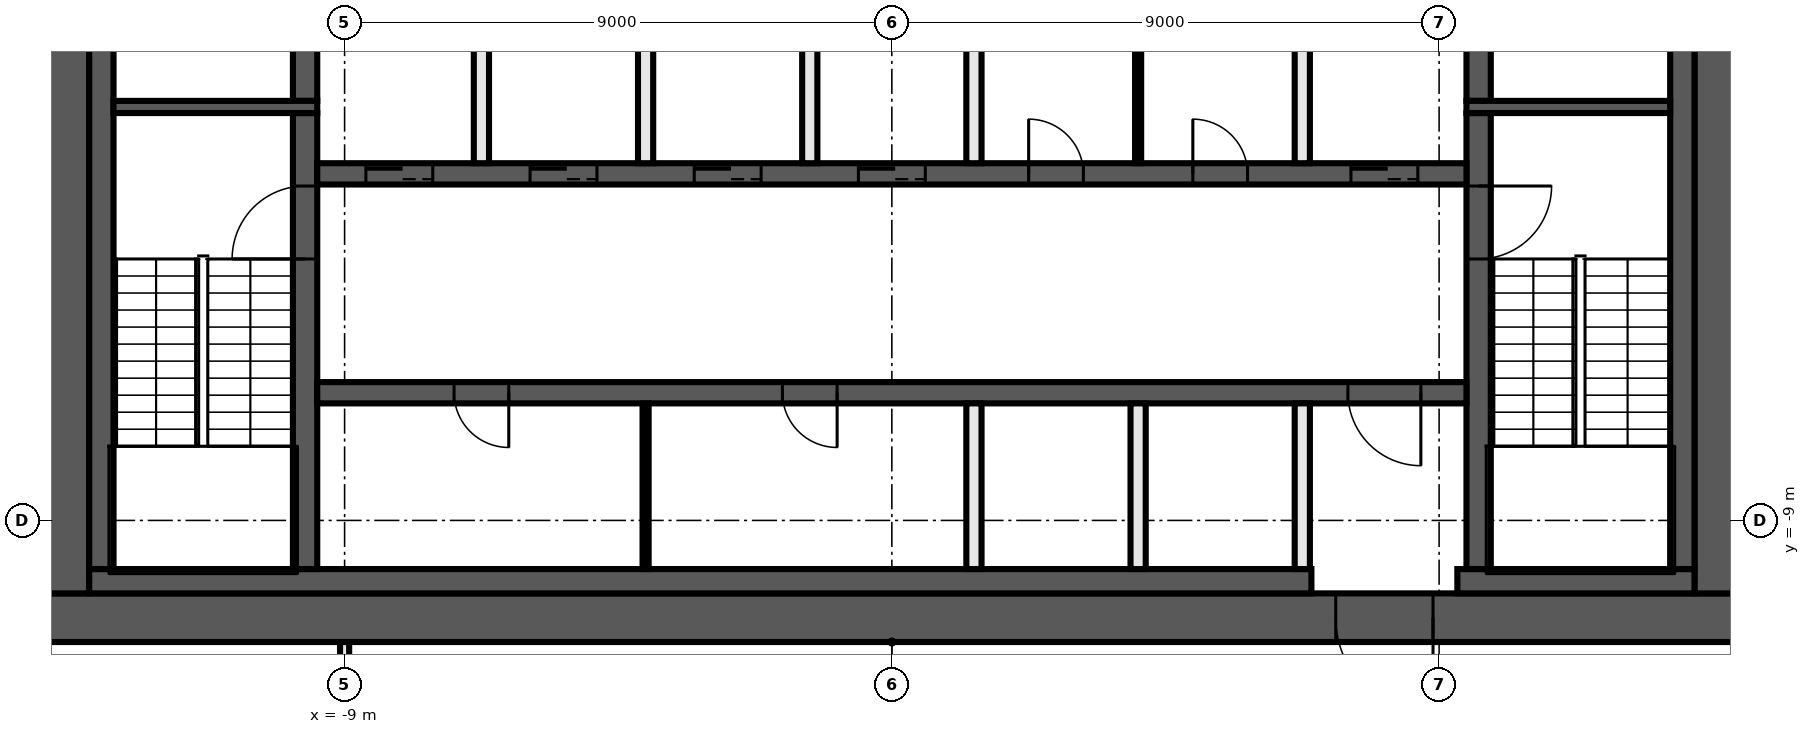
"""IFC4 building model, lengths in metres.
Left out: names, types, materials, properties, quantities, classifications, styles, units other than length and angle.
Written with IfcOpenShell. Run it as: python <this file> out.ifc"""

import sys

from ifc_helpers import new_model, si_unit, direction, frame, frame_2d, origin, place, context, subcontext, project, spatial, rectangle, extrude, element, fill, save


model = new_model("IFC4")
c1 = context("Model", 3, precision=1e-05, world=origin(), true_north=direction((0.0, 1.0)))
c2 = subcontext(c1, "Body", "Model", "MODEL_VIEW")
j1 = project(units=[si_unit("LENGTHUNIT", "METRE"), si_unit("PLANEANGLEUNIT", "RADIAN")], contexts=[c1])
p1 = place(None, origin())
s1 = spatial("IfcSite", under=j1, at=p1, CompositionType="ELEMENT")
p2 = place(p1, origin())
s2 = spatial("IfcBuilding", under=s1, at=p2, CompositionType="ELEMENT")
p3 = place(p2, frame((0.0, 0.0, 162.8)))
s3 = spatial("IfcBuildingStorey", under=s2, at=p3, CompositionType="ELEMENT", Elevation=162.8)
p4 = place(p3, frame((-9.0, -13.925, 0.0), z_axis=(0.0, 0.0, 1.0), x_axis=(0.0, 1.0, 0.0)))
e1 = element("IfcWall", 1, at=p4, inside=s3, PredefinedType="PARTITIONING", context=c2, shape_type="SweptSolid", body=[
    extrude(rectangle(XDim=2.925, YDim=0.15, at=frame_2d((1.462, 0.0))), origin(), (0.0, 0.0, 1.0), 3.82),
])
p5 = place(p3, frame((14.0, -10.6, 0.0), z_axis=(0.0, 0.0, 1.0), x_axis=(-1.0, 0.0, 0.0)))
e2 = element("IfcWall", 2, at=p5, inside=s3, PredefinedType="SHEAR", context=c2, shape_type="SweptSolid", body=[
    extrude(rectangle(XDim=28.0, YDim=0.8, at=frame_2d((14.0, 0.0))), origin(), (0.0, 0.0, 1.0), 3.82),
])
p6 = place(p5, frame((5.1, 0.0, 0.0)))
e3 = element("IfcOpeningElement", 3, at=p6, cuts=e2, PredefinedType="OPENING", context=c2, shape_type="SweptSolid", body=[
    extrude(rectangle(XDim=1.6, YDim=2.1, at=frame_2d((0.8, 1.05))), frame((0.0, 0.41, 0.0), z_axis=(0.0, -1.0, 0.0), x_axis=(1.0, 0.0, 0.0)), (0.0, 0.0, 1.0), 0.82),
])
for number, where, z_axis, x_axis in (
    (4, (13.6, 10.2, 0.0), (0.0, 0.0, 1.0), (0.0, -1.0, 0.0)),
    (5, (-13.6, -10.2, 0.0), (0.0, 0.0, 1.0), (0.0, 1.0, 0.0)),
):
    element("IfcWall", number, at=place(p3, frame(where, z_axis=z_axis, x_axis=x_axis)), inside=s3, PredefinedType="SHEAR", context=c2, shape_type="SweptSolid", body=[
        extrude(rectangle(XDim=20.4, YDim=0.8, at=frame_2d((10.2, 0.0))), origin(), (0.0, 0.0, 1.0), 3.82),
    ])
p7 = place(p3, frame((13.2, -10.0, 0.0), z_axis=(0.0, 0.0, 1.0), x_axis=(-1.0, 0.0, 0.0)))
e6 = element("IfcWall", 6, at=p7, inside=s3, PredefinedType="SHEAR", context=c2, shape_type="SweptSolid", body=[
    extrude(rectangle(XDim=3.9, YDim=0.4, at=frame_2d((1.95, 0.0))), origin(), (0.0, 0.0, 1.0), 3.82),
])
p8 = place(p3, frame((6.9, -10.0, 0.0), z_axis=(0.0, 0.0, 1.0), x_axis=(-1.0, 0.0, 0.0)))
e7 = element("IfcWall", 7, at=p8, inside=s3, PredefinedType="SHEAR", context=c2, shape_type="SweptSolid", body=[
    extrude(rectangle(XDim=20.1, YDim=0.4, at=frame_2d((10.05, 0.0))), origin(), (0.0, 0.0, 1.0), 3.82),
])
for number, where, z_axis, x_axis in (
    (8, (13.0, 9.8, 0.0), (0.0, 0.0, 1.0), (0.0, -1.0, 0.0)),
    (9, (-13.0, -9.8, 0.0), (0.0, 0.0, 1.0), (0.0, 1.0, 0.0)),
):
    element("IfcWall", number, at=place(p3, frame(where, z_axis=z_axis, x_axis=x_axis)), inside=s3, PredefinedType="SHEAR", context=c2, shape_type="SweptSolid", body=[
        extrude(rectangle(XDim=19.6, YDim=0.4, at=frame_2d((9.8, 0.0))), origin(), (0.0, 0.0, 1.0), 3.82),
    ])
p9 = place(p3, frame((9.65, -2.3, 0.0), z_axis=(0.0, 0.0, 1.0), x_axis=(0.0, -1.0, 0.0)))
e10 = element("IfcWall", 10, at=p9, inside=s3, PredefinedType="SHEAR", context=c2, shape_type="SweptSolid", body=[
    extrude(rectangle(XDim=7.5, YDim=0.4, at=frame_2d((3.75, 0.0))), origin(), (0.0, 0.0, 1.0), 3.82),
])
p10 = place(p9, frame((1.2, 0.0, 0.0)))
e11 = element("IfcOpeningElement", 11, at=p10, cuts=e10, PredefinedType="OPENING", context=c2, shape_type="SweptSolid", body=[
    extrude(rectangle(XDim=1.2, YDim=2.1, at=frame_2d((0.6, 1.05))), frame((0.0, 0.21, 0.0), z_axis=(0.0, -1.0, 0.0), x_axis=(1.0, 0.0, 0.0)), (0.0, 0.0, 1.0), 0.42),
])
p11 = place(p3, frame((9.65, 2.1, 0.0), z_axis=(0.0, 0.0, 1.0), x_axis=(0.0, -1.0, 0.0)))
e12 = element("IfcWall", 12, at=p11, inside=s3, PredefinedType="SHEAR", context=c2, shape_type="SweptSolid", body=[
    extrude(rectangle(XDim=4.2, YDim=0.4, at=frame_2d((2.1, 0.0))), origin(), (0.0, 0.0, 1.0), 3.82),
])
p12 = place(p11, frame((0.15, 0.0, 0.0)))
e13 = element("IfcOpeningElement", 13, at=p12, cuts=e12, PredefinedType="OPENING", context=c2, shape_type="SweptSolid", body=[
    extrude(rectangle(XDim=0.9, YDim=2.1, at=frame_2d((0.45, 1.05))), frame((0.0, 0.21, 0.0), z_axis=(0.0, -1.0, 0.0), x_axis=(1.0, 0.0, 0.0)), (0.0, 0.0, 1.0), 0.42),
])
p13 = place(p3, frame((-9.65, -9.8, 0.0), z_axis=(0.0, 0.0, 1.0), x_axis=(0.0, 1.0, 0.0)))
e14 = element("IfcWall", 14, at=p13, inside=s3, PredefinedType="SHEAR", context=c2, shape_type="SweptSolid", body=[
    extrude(rectangle(XDim=7.5, YDim=0.4, at=frame_2d((3.75, 0.0))), origin(), (0.0, 0.0, 1.0), 3.82),
])
p14 = place(p13, frame((5.1, 0.0, 0.0)))
e15 = element("IfcOpeningElement", 15, at=p14, cuts=e14, PredefinedType="OPENING", context=c2, shape_type="SweptSolid", body=[
    extrude(rectangle(XDim=1.2, YDim=2.1, at=frame_2d((0.6, 1.05))), frame((0.0, 0.21, 0.0), z_axis=(0.0, -1.0, 0.0), x_axis=(1.0, 0.0, 0.0)), (0.0, 0.0, 1.0), 0.42),
])
p15 = place(p3, frame((-9.65, -2.1, 0.0), z_axis=(0.0, 0.0, 1.0), x_axis=(0.0, 1.0, 0.0)))
e16 = element("IfcWall", 16, at=p15, inside=s3, PredefinedType="SHEAR", context=c2, shape_type="SweptSolid", body=[
    extrude(rectangle(XDim=4.2, YDim=0.4, at=frame_2d((2.1, 0.0))), origin(), (0.0, 0.0, 1.0), 3.82),
])
for number, where, z_axis, x_axis in (
    (17, (9.45, -2.2, 0.0), (0.0, 0.0, 1.0), (1.0, 0.0, 0.0)),
    (18, (-9.45, -2.2, 0.0), (0.0, 0.0, 1.0), (-1.0, 0.0, 0.0)),
):
    element("IfcWall", number, at=place(p3, frame(where, z_axis=z_axis, x_axis=x_axis)), inside=s3, PredefinedType="SHEAR", context=c2, shape_type="SweptSolid", body=[
        extrude(rectangle(XDim=3.35, YDim=0.2, at=frame_2d((1.675, 0.0))), origin(), (0.0, 0.0, 1.0), 3.82),
    ])
p16 = place(p3, frame((-9.45, -3.3, 0.0), z_axis=(0.0, 0.0, 1.0), x_axis=(1.0, 0.0, 0.0)))
e19 = element("IfcWall", 19, at=p16, inside=s3, PredefinedType="SHEAR", context=c2, shape_type="SweptSolid", body=[
    extrude(rectangle(XDim=18.9, YDim=0.35, at=frame_2d((9.45, 0.0))), origin(), (0.0, 0.0, 1.0), 3.82),
])
p17 = place(p16, frame((0.8, 0.0, 0.0)))
e20 = element("IfcOpeningElement", 20, at=p17, cuts=e19, PredefinedType="OPENING", context=c2, shape_type="SweptSolid", body=[
    extrude(rectangle(XDim=1.1, YDim=2.1, at=frame_2d((0.55, 1.05))), frame((0.0, 0.185, 0.0), z_axis=(0.0, -1.0, 0.0), x_axis=(1.0, 0.0, 0.0)), (0.0, 0.0, 1.0), 0.37),
])
p18 = place(p16, frame((3.5, 0.0, 0.0)))
e21 = element("IfcOpeningElement", 21, at=p18, cuts=e19, PredefinedType="OPENING", context=c2, shape_type="SweptSolid", body=[
    extrude(rectangle(XDim=1.1, YDim=2.1, at=frame_2d((0.55, 1.05))), frame((0.0, 0.185, 0.0), z_axis=(0.0, -1.0, 0.0), x_axis=(1.0, 0.0, 0.0)), (0.0, 0.0, 1.0), 0.37),
])
p19 = place(p16, frame((6.2, 0.0, 0.0)))
e22 = element("IfcOpeningElement", 22, at=p19, cuts=e19, PredefinedType="OPENING", context=c2, shape_type="SweptSolid", body=[
    extrude(rectangle(XDim=1.1, YDim=2.1, at=frame_2d((0.55, 1.05))), frame((0.0, 0.185, 0.0), z_axis=(0.0, -1.0, 0.0), x_axis=(1.0, 0.0, 0.0)), (0.0, 0.0, 1.0), 0.37),
])
p20 = place(p16, frame((8.9, 0.0, 0.0)))
e23 = element("IfcOpeningElement", 23, at=p20, cuts=e19, PredefinedType="OPENING", context=c2, shape_type="SweptSolid", body=[
    extrude(rectangle(XDim=1.1, YDim=2.1, at=frame_2d((0.55, 1.05))), frame((0.0, 0.185, 0.0), z_axis=(0.0, -1.0, 0.0), x_axis=(1.0, 0.0, 0.0)), (0.0, 0.0, 1.0), 0.37),
])
p21 = place(p16, frame((17.0, 0.0, 0.0)))
e24 = element("IfcOpeningElement", 24, at=p21, cuts=e19, PredefinedType="OPENING", context=c2, shape_type="SweptSolid", body=[
    extrude(rectangle(XDim=1.1, YDim=2.1, at=frame_2d((0.55, 1.05))), frame((0.0, 0.185, 0.0), z_axis=(0.0, -1.0, 0.0), x_axis=(1.0, 0.0, 0.0)), (0.0, 0.0, 1.0), 0.37),
])
p22 = place(p16, frame((11.7, 0.0, 0.0)))
e25 = element("IfcOpeningElement", 25, at=p22, cuts=e19, PredefinedType="OPENING", context=c2, shape_type="SweptSolid", body=[
    extrude(rectangle(XDim=0.9, YDim=2.1, at=frame_2d((0.45, 1.05))), frame((0.0, 0.185, 0.0), z_axis=(0.0, -1.0, 0.0), x_axis=(1.0, 0.0, 0.0)), (0.0, 0.0, 1.0), 0.37),
])
p23 = place(p16, frame((14.4, 0.0, 0.0)))
e26 = element("IfcOpeningElement", 26, at=p23, cuts=e19, PredefinedType="OPENING", context=c2, shape_type="SweptSolid", body=[
    extrude(rectangle(XDim=0.9, YDim=2.1, at=frame_2d((0.45, 1.05))), frame((0.0, 0.185, 0.0), z_axis=(0.0, -1.0, 0.0), x_axis=(1.0, 0.0, 0.0)), (0.0, 0.0, 1.0), 0.37),
])
p24 = place(p3, frame((9.45, -6.9, 0.0), z_axis=(0.0, 0.0, 1.0), x_axis=(-1.0, 0.0, 0.0)))
e27 = element("IfcWall", 27, at=p24, inside=s3, PredefinedType="SHEAR", context=c2, shape_type="SweptSolid", body=[
    extrude(rectangle(XDim=18.9, YDim=0.35, at=frame_2d((9.45, 0.0))), origin(), (0.0, 0.0, 1.0), 3.82),
])
p25 = place(p24, frame((0.75, 0.0, 0.0)))
e28 = element("IfcOpeningElement", 28, at=p25, cuts=e27, PredefinedType="OPENING", context=c2, shape_type="SweptSolid", body=[
    extrude(rectangle(XDim=1.2, YDim=2.1, at=frame_2d((0.6, 1.05))), frame((0.0, 0.185, 0.0), z_axis=(0.0, -1.0, 0.0), x_axis=(1.0, 0.0, 0.0)), (0.0, 0.0, 1.0), 0.37),
])
p26 = place(p24, frame((15.75, 0.0, 0.0)))
e29 = element("IfcOpeningElement", 29, at=p26, cuts=e27, PredefinedType="OPENING", context=c2, shape_type="SweptSolid", body=[
    extrude(rectangle(XDim=0.9, YDim=2.1, at=frame_2d((0.45, 1.05))), frame((0.0, 0.185, 0.0), z_axis=(0.0, -1.0, 0.0), x_axis=(1.0, 0.0, 0.0)), (0.0, 0.0, 1.0), 0.37),
])
p27 = place(p24, frame((10.35, 0.0, 0.0)))
e30 = element("IfcOpeningElement", 30, at=p27, cuts=e27, PredefinedType="OPENING", context=c2, shape_type="SweptSolid", body=[
    extrude(rectangle(XDim=0.9, YDim=2.1, at=frame_2d((0.45, 1.05))), frame((0.0, 0.185, 0.0), z_axis=(0.0, -1.0, 0.0), x_axis=(1.0, 0.0, 0.0)), (0.0, 0.0, 1.0), 0.37),
])
for number, where, z_axis, x_axis in (
    (31, (6.75, -9.8, 0.0), (0.0, 0.0, 1.0), (0.0, 1.0, 0.0)),
    (32, (6.75, -3.125, 0.0), (0.0, 0.0, 1.0), (0.0, 1.0, 0.0)),
):
    element("IfcWall", number, at=place(p3, frame(where, z_axis=z_axis, x_axis=x_axis)), inside=s3, PredefinedType="SOLIDWALL", context=c2, shape_type="SweptSolid", body=[
        extrude(rectangle(XDim=2.725, YDim=0.25, at=frame_2d((1.363, 0.0))), origin(), (0.0, 0.0, 1.0), 3.82),
    ])
p28 = place(p3, frame((4.05, -3.125, 0.0), z_axis=(0.0, 0.0, 1.0), x_axis=(0.0, 1.0, 0.0)))
e33 = element("IfcWall", 33, at=p28, inside=s3, PredefinedType="PARTITIONING", context=c2, shape_type="SweptSolid", body=[
    extrude(rectangle(XDim=2.725, YDim=0.1, at=frame_2d((1.363, 0.0))), origin(), (0.0, 0.0, 1.0), 3.82),
])
for number, where, z_axis, x_axis in (
    (34, (4.05, -9.8, 0.0), (0.0, 0.0, 1.0), (0.0, 1.0, 0.0)),
    (35, (1.35, -9.8, 0.0), (0.0, 0.0, 1.0), (0.0, 1.0, 0.0)),
    (36, (1.35, -3.125, 0.0), (0.0, 0.0, 1.0), (0.0, 1.0, 0.0)),
    (37, (-1.35, -3.125, 0.0), (0.0, 0.0, 1.0), (0.0, 1.0, 0.0)),
):
    element("IfcWall", number, at=place(p3, frame(where, z_axis=z_axis, x_axis=x_axis)), inside=s3, PredefinedType="SOLIDWALL", context=c2, shape_type="SweptSolid", body=[
        extrude(rectangle(XDim=2.725, YDim=0.25, at=frame_2d((1.363, 0.0))), origin(), (0.0, 0.0, 1.0), 3.82),
    ])
p29 = place(p3, frame((-4.05, -9.8, 0.0), z_axis=(0.0, 0.0, 1.0), x_axis=(0.0, 1.0, 0.0)))
e38 = element("IfcWall", 38, at=p29, inside=s3, PredefinedType="PARTITIONING", context=c2, shape_type="SweptSolid", body=[
    extrude(rectangle(XDim=2.725, YDim=0.1, at=frame_2d((1.363, 0.0))), origin(), (0.0, 0.0, 1.0), 3.82),
])
for number, where, z_axis, x_axis in (
    (39, (-4.05, -3.125, 0.0), (0.0, 0.0, 1.0), (0.0, 1.0, 0.0)),
    (40, (-6.75, -3.125, 0.0), (0.0, 0.0, 1.0), (0.0, 1.0, 0.0)),
):
    element("IfcWall", number, at=place(p3, frame(where, z_axis=z_axis, x_axis=x_axis)), inside=s3, PredefinedType="SOLIDWALL", context=c2, shape_type="SweptSolid", body=[
        extrude(rectangle(XDim=2.725, YDim=0.25, at=frame_2d((1.363, 0.0))), origin(), (0.0, 0.0, 1.0), 3.82),
    ])
p30 = place(p17, origin())
e41 = element("IfcDoor", 41, at=p30, inside=s3, OperationType="DOUBLE_DOOR_SLIDING", PredefinedType="DOOR", context=c2, shape_type="SweptSolid", body=[
    extrude(rectangle(XDim=1.1, YDim=2.1, at=frame_2d((0.55, 1.05))), frame((0.0, 0.025, 0.0), z_axis=(0.0, -1.0, 0.0), x_axis=(1.0, 0.0, 0.0)), (0.0, 0.0, 1.0), 0.05),
])
fill(e20, e41)
p31 = place(p18, origin())
e42 = element("IfcDoor", 42, at=p31, inside=s3, OperationType="DOUBLE_DOOR_SLIDING", PredefinedType="DOOR", context=c2, shape_type="SweptSolid", body=[
    extrude(rectangle(XDim=1.1, YDim=2.1, at=frame_2d((0.55, 1.05))), frame((0.0, 0.025, 0.0), z_axis=(0.0, -1.0, 0.0), x_axis=(1.0, 0.0, 0.0)), (0.0, 0.0, 1.0), 0.05),
])
fill(e21, e42)
p32 = place(p19, origin())
e43 = element("IfcDoor", 43, at=p32, inside=s3, OperationType="DOUBLE_DOOR_SLIDING", PredefinedType="DOOR", context=c2, shape_type="SweptSolid", body=[
    extrude(rectangle(XDim=1.1, YDim=2.1, at=frame_2d((0.55, 1.05))), frame((0.0, 0.025, 0.0), z_axis=(0.0, -1.0, 0.0), x_axis=(1.0, 0.0, 0.0)), (0.0, 0.0, 1.0), 0.05),
])
fill(e22, e43)
p33 = place(p20, origin())
e44 = element("IfcDoor", 44, at=p33, inside=s3, OperationType="DOUBLE_DOOR_SLIDING", PredefinedType="DOOR", context=c2, shape_type="SweptSolid", body=[
    extrude(rectangle(XDim=1.1, YDim=2.1, at=frame_2d((0.55, 1.05))), frame((0.0, 0.025, 0.0), z_axis=(0.0, -1.0, 0.0), x_axis=(1.0, 0.0, 0.0)), (0.0, 0.0, 1.0), 0.05),
])
fill(e23, e44)
p34 = place(p21, origin())
e45 = element("IfcDoor", 45, at=p34, inside=s3, OperationType="DOUBLE_DOOR_SLIDING", PredefinedType="DOOR", context=c2, shape_type="SweptSolid", body=[
    extrude(rectangle(XDim=1.1, YDim=2.1, at=frame_2d((0.55, 1.05))), frame((0.0, 0.025, 0.0), z_axis=(0.0, -1.0, 0.0), x_axis=(1.0, 0.0, 0.0)), (0.0, 0.0, 1.0), 0.05),
])
fill(e24, e45)
p35 = place(p6, origin())
e46 = element("IfcDoor", 46, at=p35, inside=s3, OperationType="DOUBLE_DOOR_SINGLE_SWING", PredefinedType="DOOR", context=c2, shape_type="SweptSolid", body=[
    extrude(rectangle(XDim=1.6, YDim=2.1, at=frame_2d((0.8, 1.05))), frame((0.0, 0.025, 0.0), z_axis=(0.0, -1.0, 0.0), x_axis=(1.0, 0.0, 0.0)), (0.0, 0.0, 1.0), 0.05),
])
fill(e3, e46)
p36 = place(p25, origin())
e47 = element("IfcDoor", 47, at=p36, inside=s3, OperationType="SINGLE_SWING_LEFT", PredefinedType="DOOR", context=c2, shape_type="SweptSolid", body=[
    extrude(rectangle(XDim=1.2, YDim=2.1, at=frame_2d((0.6, 1.05))), frame((0.0, 0.025, 0.0), z_axis=(0.0, -1.0, 0.0), x_axis=(1.0, 0.0, 0.0)), (0.0, 0.0, 1.0), 0.05),
])
fill(e28, e47)
p37 = place(p22, origin())
e48 = element("IfcDoor", 48, at=p37, inside=s3, OperationType="SINGLE_SWING_RIGHT", PredefinedType="DOOR", context=c2, shape_type="SweptSolid", body=[
    extrude(rectangle(XDim=0.9, YDim=2.1, at=frame_2d((0.45, 1.05))), frame((0.0, 0.025, 0.0), z_axis=(0.0, -1.0, 0.0), x_axis=(1.0, 0.0, 0.0)), (0.0, 0.0, 1.0), 0.05),
])
fill(e25, e48)
p38 = place(p23, origin())
e49 = element("IfcDoor", 49, at=p38, inside=s3, OperationType="SINGLE_SWING_LEFT", PredefinedType="DOOR", context=c2, shape_type="SweptSolid", body=[
    extrude(rectangle(XDim=0.9, YDim=2.1, at=frame_2d((0.45, 1.05))), frame((0.0, 0.025, 0.0), z_axis=(0.0, -1.0, 0.0), x_axis=(1.0, 0.0, 0.0)), (0.0, 0.0, 1.0), 0.05),
])
fill(e26, e49)
p39 = place(p26, origin())
e50 = element("IfcDoor", 50, at=p39, inside=s3, OperationType="SINGLE_SWING_RIGHT", PredefinedType="DOOR", context=c2, shape_type="SweptSolid", body=[
    extrude(rectangle(XDim=0.9, YDim=2.1, at=frame_2d((0.45, 1.05))), frame((0.0, 0.025, 0.0), z_axis=(0.0, -1.0, 0.0), x_axis=(1.0, 0.0, 0.0)), (0.0, 0.0, 1.0), 0.05),
])
fill(e29, e50)
p40 = place(p27, origin())
e51 = element("IfcDoor", 51, at=p40, inside=s3, OperationType="SINGLE_SWING_LEFT", PredefinedType="DOOR", context=c2, shape_type="SweptSolid", body=[
    extrude(rectangle(XDim=0.9, YDim=2.1, at=frame_2d((0.45, 1.05))), frame((0.0, 0.025, 0.0), z_axis=(0.0, -1.0, 0.0), x_axis=(1.0, 0.0, 0.0)), (0.0, 0.0, 1.0), 0.05),
])
fill(e30, e51)
p41 = place(p10, origin())
e52 = element("IfcDoor", 52, at=p41, inside=s3, OperationType="SINGLE_SWING_RIGHT", PredefinedType="DOOR", context=c2, shape_type="SweptSolid", body=[
    extrude(rectangle(XDim=1.2, YDim=2.1, at=frame_2d((0.6, 1.05))), frame((0.0, 0.025, 0.0), z_axis=(0.0, -1.0, 0.0), x_axis=(1.0, 0.0, 0.0)), (0.0, 0.0, 1.0), 0.05),
])
fill(e11, e52)
p42 = place(p14, origin())
e53 = element("IfcDoor", 53, at=p42, inside=s3, OperationType="SINGLE_SWING_LEFT", PredefinedType="DOOR", context=c2, shape_type="SweptSolid", body=[
    extrude(rectangle(XDim=1.2, YDim=2.1, at=frame_2d((0.6, 1.05))), frame((0.0, 0.025, 0.0), z_axis=(0.0, -1.0, 0.0), x_axis=(1.0, 0.0, 0.0)), (0.0, 0.0, 1.0), 0.05),
])
fill(e15, e53)
save(model, sys.argv[1])
